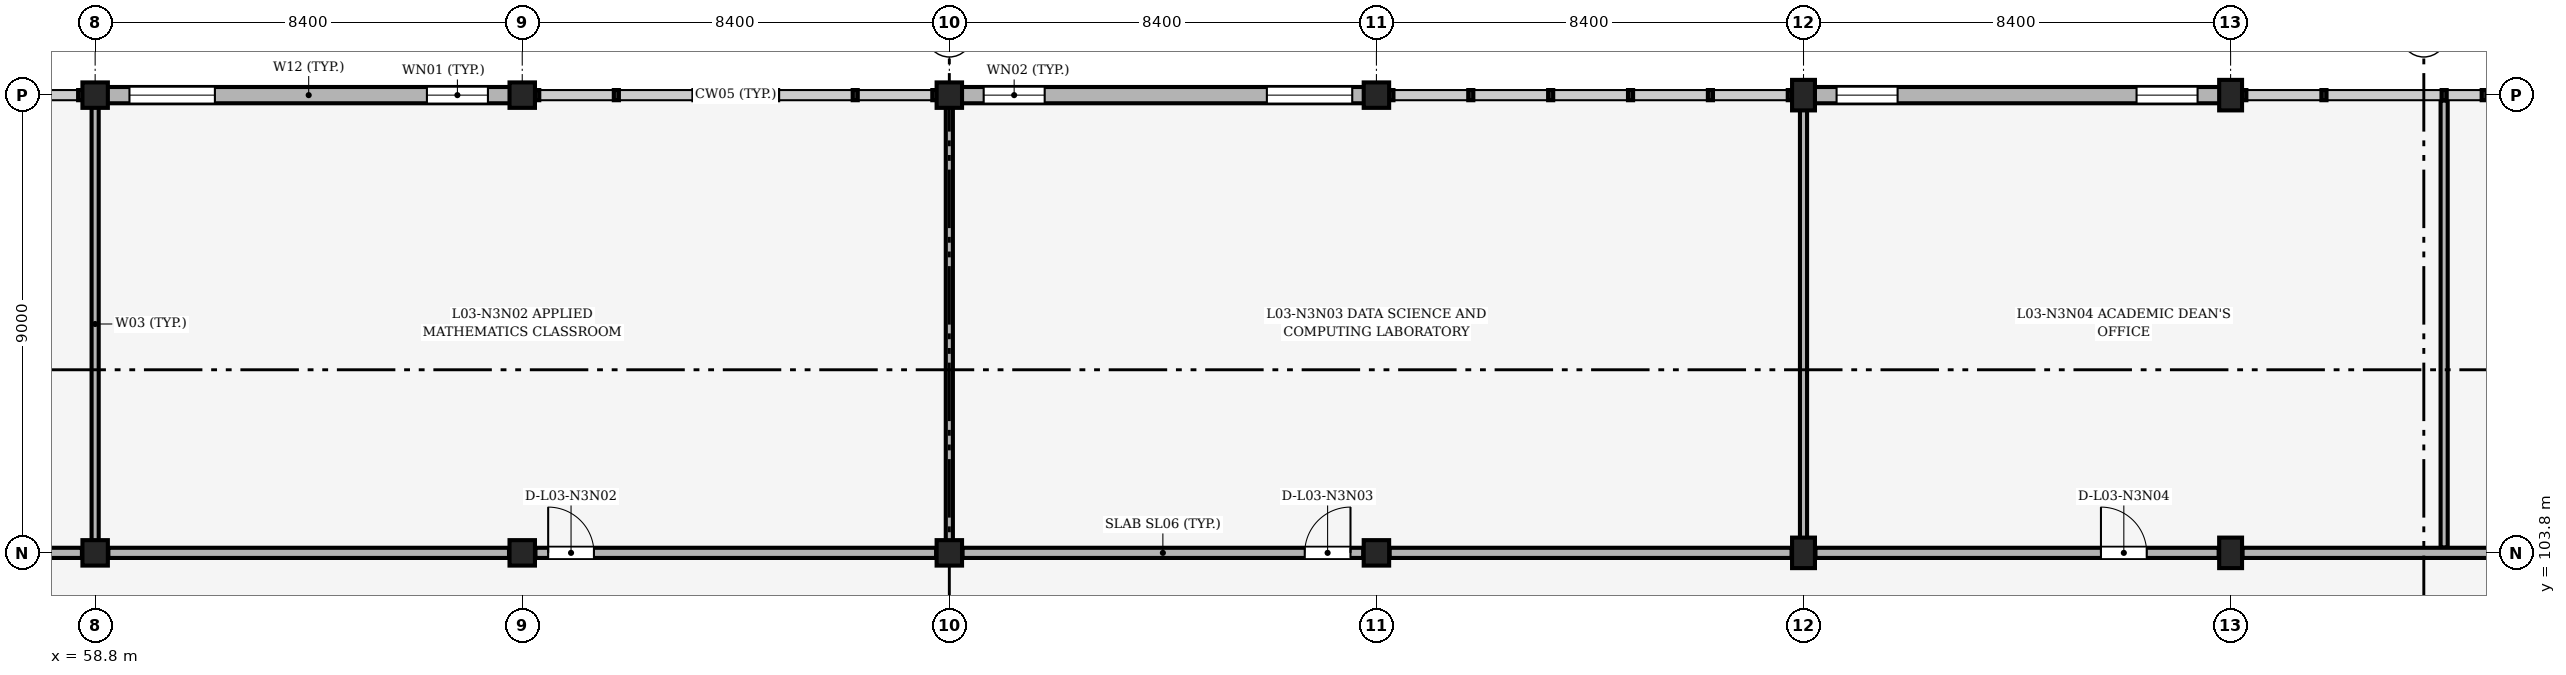
"""IFC4 building model, lengths in metres.
Left out: names, types, materials, properties, quantities, classifications, styles, units other than length and angle.
Written with IfcOpenShell. Run it as: python <this file> out.ifc"""

import sys

from ifc_helpers import new_model, si_unit, direction, frame, frame_2d, origin, origin_2d, place, context, subcontext, project, spatial, rectangle, extrude, element, fill, save


model = new_model("IFC4")
c1 = context("Model", 3, precision=1e-05, world=origin(), true_north=direction((0.0, 1.0)))
c2 = subcontext(c1, "Body", "Model", "MODEL_VIEW")
j1 = project(units=[si_unit("LENGTHUNIT", "METRE"), si_unit("PLANEANGLEUNIT", "RADIAN")], contexts=[c1])
p1 = place(None, origin())
s1 = spatial("IfcSite", under=j1, at=p1, CompositionType="ELEMENT")
p2 = place(p1, origin())
s2 = spatial("IfcBuilding", under=s1, at=p2, CompositionType="ELEMENT")
p3 = place(p2, frame((0.0, 0.0, 13.2)))
s3 = spatial("IfcBuildingStorey", under=s2, at=p3, CompositionType="ELEMENT", Elevation=13.2)
for number, where, z_axis, x_axis in (
    (1, (58.8, 103.8, 0.0), (0.0, 0.0, 1.0), (1.0, 0.0, 0.0)),
    (2, (58.8, 112.8, 0.0), (0.0, 0.0, 1.0), (1.0, 0.0, 0.0)),
    (3, (67.2, 103.8, 0.0), (0.0, 0.0, 1.0), (1.0, 0.0, 0.0)),
    (4, (67.2, 112.8, 0.0), (0.0, 0.0, 1.0), (1.0, 0.0, 0.0)),
    (5, (75.6, 103.8, 0.0), (0.0, 0.0, 1.0), (1.0, 0.0, 0.0)),
    (6, (75.6, 112.8, 0.0), (0.0, 0.0, 1.0), (1.0, 0.0, 0.0)),
    (7, (84.0, 103.8, 0.0), (0.0, 0.0, 1.0), (1.0, 0.0, 0.0)),
    (8, (84.0, 112.8, 0.0), (0.0, 0.0, 1.0), (1.0, 0.0, 0.0)),
):
    element("IfcColumn", number, at=place(p3, frame(where, z_axis=z_axis, x_axis=x_axis)), inside=s3, PredefinedType="COLUMN", context=c2, shape_type="SweptSolid", body=[
        extrude(rectangle(XDim=0.5, YDim=0.5, at=origin_2d()), origin(), (0.0, 0.0, 1.0), 4.2),
    ])
for number, where, z_axis, x_axis in (
    (9, (92.4, 103.8, 0.0), (0.0, 0.0, 1.0), (1.0, 0.0, 0.0)),
    (10, (92.4, 112.8, 0.0), (0.0, 0.0, 1.0), (1.0, 0.0, 0.0)),
    (11, (100.8, 103.8, 0.0), (0.0, 0.0, 1.0), (1.0, 0.0, 0.0)),
    (12, (100.8, 112.8, 0.0), (0.0, 0.0, 1.0), (1.0, 0.0, 0.0)),
):
    element("IfcColumn", number, at=place(p3, frame(where, z_axis=z_axis, x_axis=x_axis)), inside=s3, PredefinedType="COLUMN", context=c2, shape_type="SweptSolid", body=[
        extrude(rectangle(XDim=0.45, YDim=0.6, at=origin_2d()), origin(), (0.0, 0.0, 1.0), 4.2),
    ])
p4 = place(p3, frame((59.025, 112.8, 0.0), z_axis=(0.0, 0.0, 1.0), x_axis=(1.0, 0.0, 0.0)))
e13 = element("IfcWall", 13, at=p4, inside=s3, PredefinedType="SOLIDWALL", context=c2, shape_type="SweptSolid", body=[
    extrude(rectangle(XDim=7.95, YDim=0.32, at=frame_2d((3.975, 0.0))), origin(), (0.0, 0.0, 1.0), 3.01),
])
p5 = place(p4, frame((0.45, 0.0, 0.9)))
e14 = element("IfcOpeningElement", 14, at=p5, cuts=e13, PredefinedType="OPENING", context=c2, shape_type="SweptSolid", body=[
    extrude(rectangle(XDim=1.68, YDim=1.96, at=frame_2d((0.84, 0.98))), frame((0.0, 0.17, 0.0), z_axis=(0.0, -1.0, 0.0), x_axis=(1.0, 0.0, 0.0)), (0.0, 0.0, 1.0), 0.34),
])
p6 = place(p4, frame((6.3, 0.0, 0.9)))
e15 = element("IfcOpeningElement", 15, at=p6, cuts=e13, PredefinedType="OPENING", context=c2, shape_type="SweptSolid", body=[
    extrude(rectangle(XDim=1.2, YDim=1.5, at=frame_2d((0.6, 0.75))), frame((0.0, 0.17, 0.0), z_axis=(0.0, -1.0, 0.0), x_axis=(1.0, 0.0, 0.0)), (0.0, 0.0, 1.0), 0.34),
])
p7 = place(p3, frame((75.825, 112.8, 0.0), z_axis=(0.0, 0.0, 1.0), x_axis=(1.0, 0.0, 0.0)))
e16 = element("IfcWall", 16, at=p7, inside=s3, PredefinedType="SOLIDWALL", context=c2, shape_type="SweptSolid", body=[
    extrude(rectangle(XDim=7.95, YDim=0.32, at=frame_2d((3.975, 0.0))), origin(), (0.0, 0.0, 1.0), 2.96),
])
p8 = place(p7, frame((0.45, 0.0, 0.9)))
e17 = element("IfcOpeningElement", 17, at=p8, cuts=e16, PredefinedType="OPENING", context=c2, shape_type="SweptSolid", body=[
    extrude(rectangle(XDim=1.2, YDim=1.8, at=frame_2d((0.6, 0.9))), frame((0.0, 0.17, 0.0), z_axis=(0.0, -1.0, 0.0), x_axis=(1.0, 0.0, 0.0)), (0.0, 0.0, 1.0), 0.34),
])
p9 = place(p7, frame((6.02, 0.0, 0.9)))
e18 = element("IfcOpeningElement", 18, at=p9, cuts=e16, PredefinedType="OPENING", context=c2, shape_type="SweptSolid", body=[
    extrude(rectangle(XDim=1.68, YDim=1.91, at=frame_2d((0.84, 0.955))), frame((0.0, 0.17, 0.0), z_axis=(0.0, -1.0, 0.0), x_axis=(1.0, 0.0, 0.0)), (0.0, 0.0, 1.0), 0.34),
])
p10 = place(p3, frame((92.6, 112.8, 0.0), z_axis=(0.0, 0.0, 1.0), x_axis=(1.0, 0.0, 0.0)))
e19 = element("IfcWall", 19, at=p10, inside=s3, PredefinedType="SOLIDWALL", context=c2, shape_type="SweptSolid", body=[
    extrude(rectangle(XDim=8.0, YDim=0.32, at=frame_2d((4.0, 0.0))), origin(), (0.0, 0.0, 1.0), 3.43),
])
p11 = place(p10, frame((0.45, 0.0, 0.9)))
e20 = element("IfcOpeningElement", 20, at=p11, cuts=e19, PredefinedType="OPENING", context=c2, shape_type="SweptSolid", body=[
    extrude(rectangle(XDim=1.2, YDim=1.5, at=frame_2d((0.6, 0.75))), frame((0.0, 0.17, 0.0), z_axis=(0.0, -1.0, 0.0), x_axis=(1.0, 0.0, 0.0)), (0.0, 0.0, 1.0), 0.34),
])
p12 = place(p10, frame((6.35, 0.0, 0.9)))
e21 = element("IfcOpeningElement", 21, at=p12, cuts=e19, PredefinedType="OPENING", context=c2, shape_type="SweptSolid", body=[
    extrude(rectangle(XDim=1.2, YDim=1.8, at=frame_2d((0.6, 0.9))), frame((0.0, 0.17, 0.0), z_axis=(0.0, -1.0, 0.0), x_axis=(1.0, 0.0, 0.0)), (0.0, 0.0, 1.0), 0.34),
])
p13 = place(p3, frame((58.8, 103.905, 0.0), z_axis=(0.0, 0.0, 1.0), x_axis=(0.0, 1.0, 0.0)))
e22 = element("IfcWall", 22, at=p13, inside=s3, PredefinedType="PARTITIONING", context=c2, shape_type="SweptSolid", body=[
    extrude(rectangle(XDim=8.79, YDim=0.14, at=frame_2d((4.395, 0.0))), origin(), (0.0, 0.0, 1.0), 3.01),
])
p14 = place(p3, frame((75.6, 103.905, 0.0), z_axis=(0.0, 0.0, 1.0), x_axis=(0.0, 1.0, 0.0)))
e23 = element("IfcWall", 23, at=p14, inside=s3, PredefinedType="PARTITIONING", context=c2, shape_type="SweptSolid", body=[
    extrude(rectangle(XDim=8.79, YDim=0.14, at=frame_2d((4.395, 0.0))), origin(), (0.0, 0.0, 1.0), 3.16),
])
p15 = place(p3, frame((92.4, 103.905, 0.0), z_axis=(0.0, 0.0, 1.0), x_axis=(0.0, 1.0, 0.0)))
e24 = element("IfcWall", 24, at=p15, inside=s3, PredefinedType="PARTITIONING", context=c2, shape_type="SweptSolid", body=[
    extrude(rectangle(XDim=8.79, YDim=0.14, at=frame_2d((4.395, 0.0))), origin(), (0.0, 0.0, 1.0), 3.48),
])
p16 = place(p3, frame((105.0, 103.905, 0.0), z_axis=(0.0, 0.0, 1.0), x_axis=(0.0, 1.0, 0.0)))
e25 = element("IfcWall", 25, at=p16, inside=s3, PredefinedType="PARTITIONING", context=c2, shape_type="SweptSolid", body=[
    extrude(rectangle(XDim=8.79, YDim=0.14, at=frame_2d((4.395, 0.0))), origin(), (0.0, 0.0, 1.0), 3.9),
])
p17 = place(p3, frame((50.66, 103.8, 0.0), z_axis=(0.0, 0.0, 1.0), x_axis=(1.0, 0.0, 0.0)))
e26 = element("IfcWall", 26, at=p17, inside=s3, PredefinedType="PARTITIONING", context=c2, shape_type="SweptSolid", body=[
    extrude(rectangle(XDim=7.88, YDim=0.2, at=frame_2d((3.94, 0.0))), origin(), (0.0, 0.0, 1.0), 3.26),
])
p18 = place(p17, frame((0.25, 0.0, 0.0)))
e27 = element("IfcOpeningElement", 27, at=p18, cuts=e26, PredefinedType="OPENING", context=c2, shape_type="SweptSolid", body=[
    extrude(rectangle(XDim=0.9, YDim=2.1, at=frame_2d((0.45, 1.05))), frame((0.0, 0.11, 0.0), z_axis=(0.0, -1.0, 0.0), x_axis=(1.0, 0.0, 0.0)), (0.0, 0.0, 1.0), 0.22),
])
p19 = place(p3, frame((59.06, 103.8, 0.0), z_axis=(0.0, 0.0, 1.0), x_axis=(1.0, 0.0, 0.0)))
e28 = element("IfcWall", 28, at=p19, inside=s3, PredefinedType="PARTITIONING", context=c2, shape_type="SweptSolid", body=[
    extrude(rectangle(XDim=7.88, YDim=0.2, at=frame_2d((3.94, 0.0))), origin(), (0.0, 0.0, 1.0), 3.31),
])
p20 = place(p3, frame((67.46, 103.8, 0.0), z_axis=(0.0, 0.0, 1.0), x_axis=(1.0, 0.0, 0.0)))
e29 = element("IfcWall", 29, at=p20, inside=s3, PredefinedType="PARTITIONING", context=c2, shape_type="SweptSolid", body=[
    extrude(rectangle(XDim=7.88, YDim=0.2, at=frame_2d((3.94, 0.0))), origin(), (0.0, 0.0, 1.0), 3.26),
])
p21 = place(p20, frame((0.25, 0.0, 0.0)))
e30 = element("IfcOpeningElement", 30, at=p21, cuts=e29, PredefinedType="OPENING", context=c2, shape_type="SweptSolid", body=[
    extrude(rectangle(XDim=0.9, YDim=2.1, at=frame_2d((0.45, 1.05))), frame((0.0, 0.11, 0.0), z_axis=(0.0, -1.0, 0.0), x_axis=(1.0, 0.0, 0.0)), (0.0, 0.0, 1.0), 0.22),
])
p22 = place(p3, frame((75.86, 103.8, 0.0), z_axis=(0.0, 0.0, 1.0), x_axis=(1.0, 0.0, 0.0)))
e31 = element("IfcWall", 31, at=p22, inside=s3, PredefinedType="PARTITIONING", context=c2, shape_type="SweptSolid", body=[
    extrude(rectangle(XDim=7.88, YDim=0.2, at=frame_2d((3.94, 0.0))), origin(), (0.0, 0.0, 1.0), 3.21),
])
p23 = place(p22, frame((6.73, 0.0, 0.0)))
e32 = element("IfcOpeningElement", 32, at=p23, cuts=e31, PredefinedType="OPENING", context=c2, shape_type="SweptSolid", body=[
    extrude(rectangle(XDim=0.9, YDim=2.1, at=frame_2d((0.45, 1.05))), frame((0.0, 0.11, 0.0), z_axis=(0.0, -1.0, 0.0), x_axis=(1.0, 0.0, 0.0)), (0.0, 0.0, 1.0), 0.22),
])
p24 = place(p3, frame((84.26, 103.8, 0.0), z_axis=(0.0, 0.0, 1.0), x_axis=(1.0, 0.0, 0.0)))
e33 = element("IfcWall", 33, at=p24, inside=s3, PredefinedType="PARTITIONING", context=c2, shape_type="SweptSolid", body=[
    extrude(rectangle(XDim=7.905, YDim=0.2, at=frame_2d((3.953, 0.0))), origin(), (0.0, 0.0, 1.0), 3.43),
])
p25 = place(p3, frame((92.635, 103.8, 0.0), z_axis=(0.0, 0.0, 1.0), x_axis=(1.0, 0.0, 0.0)))
e34 = element("IfcWall", 34, at=p25, inside=s3, PredefinedType="PARTITIONING", context=c2, shape_type="SweptSolid", body=[
    extrude(rectangle(XDim=7.93, YDim=0.2, at=frame_2d((3.965, 0.0))), origin(), (0.0, 0.0, 1.0), 3.48),
])
p26 = place(p25, frame((5.615, 0.0, 0.0)))
e35 = element("IfcOpeningElement", 35, at=p26, cuts=e34, PredefinedType="OPENING", context=c2, shape_type="SweptSolid", body=[
    extrude(rectangle(XDim=0.9, YDim=2.1, at=frame_2d((0.45, 1.05))), frame((0.0, 0.11, 0.0), z_axis=(0.0, -1.0, 0.0), x_axis=(1.0, 0.0, 0.0)), (0.0, 0.0, 1.0), 0.22),
])
p27 = place(p3, frame((101.035, 103.8, 0.0), z_axis=(0.0, 0.0, 1.0), x_axis=(1.0, 0.0, 0.0)))
e36 = element("IfcWall", 36, at=p27, inside=s3, PredefinedType="PARTITIONING", context=c2, shape_type="SweptSolid", body=[
    extrude(rectangle(XDim=7.93, YDim=0.2, at=frame_2d((3.965, 0.0))), origin(), (0.0, 0.0, 1.0), 3.43),
])
p28 = place(p5, origin())
e37 = element("IfcWindow", 37, at=p28, inside=s3, PartitioningType="SINGLE_PANEL", PredefinedType="WINDOW", context=c2, shape_type="SweptSolid", body=[
    extrude(rectangle(XDim=1.68, YDim=1.96, at=frame_2d((0.84, 0.98))), frame((0.0, 0.03, 0.0), z_axis=(0.0, -1.0, 0.0), x_axis=(1.0, 0.0, 0.0)), (0.0, 0.0, 1.0), 0.06),
])
fill(e14, e37)
p29 = place(p6, origin())
e38 = element("IfcWindow", 38, at=p29, inside=s3, PartitioningType="SINGLE_PANEL", PredefinedType="WINDOW", context=c2, shape_type="SweptSolid", body=[
    extrude(rectangle(XDim=1.2, YDim=1.5, at=frame_2d((0.6, 0.75))), frame((0.0, 0.03, 0.0), z_axis=(0.0, -1.0, 0.0), x_axis=(1.0, 0.0, 0.0)), (0.0, 0.0, 1.0), 0.06),
])
fill(e15, e38)
p30 = place(p8, origin())
e39 = element("IfcWindow", 39, at=p30, inside=s3, PartitioningType="SINGLE_PANEL", PredefinedType="WINDOW", context=c2, shape_type="SweptSolid", body=[
    extrude(rectangle(XDim=1.2, YDim=1.8, at=frame_2d((0.6, 0.9))), frame((0.0, 0.03, 0.0), z_axis=(0.0, -1.0, 0.0), x_axis=(1.0, 0.0, 0.0)), (0.0, 0.0, 1.0), 0.06),
])
fill(e17, e39)
p31 = place(p9, origin())
e40 = element("IfcWindow", 40, at=p31, inside=s3, PartitioningType="SINGLE_PANEL", PredefinedType="WINDOW", context=c2, shape_type="SweptSolid", body=[
    extrude(rectangle(XDim=1.68, YDim=1.91, at=frame_2d((0.84, 0.955))), frame((0.0, 0.03, 0.0), z_axis=(0.0, -1.0, 0.0), x_axis=(1.0, 0.0, 0.0)), (0.0, 0.0, 1.0), 0.06),
])
fill(e18, e40)
p32 = place(p11, origin())
e41 = element("IfcWindow", 41, at=p32, inside=s3, PartitioningType="SINGLE_PANEL", PredefinedType="WINDOW", context=c2, shape_type="SweptSolid", body=[
    extrude(rectangle(XDim=1.2, YDim=1.5, at=frame_2d((0.6, 0.75))), frame((0.0, 0.03, 0.0), z_axis=(0.0, -1.0, 0.0), x_axis=(1.0, 0.0, 0.0)), (0.0, 0.0, 1.0), 0.06),
])
fill(e20, e41)
p33 = place(p12, origin())
e42 = element("IfcWindow", 42, at=p33, inside=s3, PartitioningType="SINGLE_PANEL", PredefinedType="WINDOW", context=c2, shape_type="SweptSolid", body=[
    extrude(rectangle(XDim=1.2, YDim=1.8, at=frame_2d((0.6, 0.9))), frame((0.0, 0.03, 0.0), z_axis=(0.0, -1.0, 0.0), x_axis=(1.0, 0.0, 0.0)), (0.0, 0.0, 1.0), 0.06),
])
fill(e21, e42)
p34 = place(p21, origin())
e43 = element("IfcDoor", 43, at=p34, inside=s3, OperationType="SINGLE_SWING_LEFT", PredefinedType="DOOR", context=c2, shape_type="SweptSolid", body=[
    extrude(rectangle(XDim=0.9, YDim=2.1, at=frame_2d((0.45, 1.05))), frame((0.0, 0.025, 0.0), z_axis=(0.0, -1.0, 0.0), x_axis=(1.0, 0.0, 0.0)), (0.0, 0.0, 1.0), 0.05),
])
fill(e30, e43)
p35 = place(p23, origin())
e44 = element("IfcDoor", 44, at=p35, inside=s3, OperationType="SINGLE_SWING_RIGHT", PredefinedType="DOOR", context=c2, shape_type="SweptSolid", body=[
    extrude(rectangle(XDim=0.9, YDim=2.1, at=frame_2d((0.45, 1.05))), frame((0.0, 0.025, 0.0), z_axis=(0.0, -1.0, 0.0), x_axis=(1.0, 0.0, 0.0)), (0.0, 0.0, 1.0), 0.05),
])
fill(e32, e44)
p36 = place(p26, origin())
e45 = element("IfcDoor", 45, at=p36, inside=s3, OperationType="SINGLE_SWING_LEFT", PredefinedType="DOOR", context=c2, shape_type="SweptSolid", body=[
    extrude(rectangle(XDim=0.9, YDim=2.1, at=frame_2d((0.45, 1.05))), frame((0.0, 0.025, 0.0), z_axis=(0.0, -1.0, 0.0), x_axis=(1.0, 0.0, 0.0)), (0.0, 0.0, 1.0), 0.05),
])
fill(e35, e45)
save(model, sys.argv[1])
